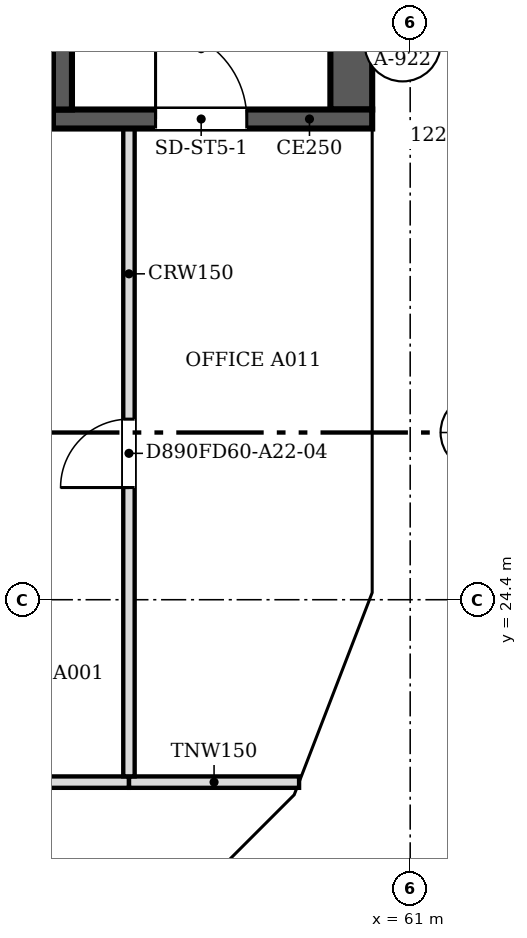
"""IFC4 building model, lengths in metres.
Left out: names, types, materials, properties, quantities, classifications, styles, units other than length and angle.
Written with IfcOpenShell. Run it as: python <this file> out.ifc"""

import sys

from ifc_helpers import new_model, si_unit, direction, frame, frame_2d, origin, place, context, subcontext, project, spatial, polyline, rectangle, outline, extrude, faceted_brep, source, transform, mapped, element, fill, save


model = new_model("IFC4")
c1 = context("Model", 3, precision=1e-05, world=origin(), true_north=direction((0.0, 1.0)))
c2 = subcontext(c1, "Body", "Model", "MODEL_VIEW")
j1 = project(units=[si_unit("LENGTHUNIT", "METRE"), si_unit("PLANEANGLEUNIT", "RADIAN")], contexts=[c1])
p1 = place(None, origin())
s1 = spatial("IfcSite", under=j1, at=p1, CompositionType="ELEMENT")
p2 = place(p1, origin())
s2 = spatial("IfcBuilding", under=s1, at=p2, CompositionType="ELEMENT")
p3 = place(p2, frame((0.0, 0.0, 255.9)))
s3 = spatial("IfcBuildingStorey", under=s2, at=p3, CompositionType="ELEMENT", Elevation=255.9)
m1 = source(origin(), c2, "Body", "Brep", [
    faceted_brep([(0.053, -0.25, 0.0), (2.997, -0.25, 3.8), (0.053, -0.25, 7.6), (0.0, -0.25, 7.532), (0.0, -0.25, 0.068), (0.106, 0.25, 7.531), (2.944, 0.25, 3.868), (2.944, 0.25, 3.732), (0.106, 0.25, 0.068), (2.997, 0.0, 3.8), (0.053, 0.0, 0.0), (0.053, 0.0, 7.6)], [[[0, 1, 2, 3, 4]], [[5, 6, 7, 8]], [[8, 7, 9, 1, 0, 10]], [[6, 5, 11, 2, 1, 9]], [[3, 2, 11]], [[10, 0, 4]], [[8, 10, 4, 3, 11, 5]], [[9, 7, 6]]]),
])
p4 = place(p3, frame((57.569, 19.574, -3.8), z_axis=(0.0, 0.0, 1.0), x_axis=(0.707106781187, 0.707106781187, 0.0)))
e1 = element("IfcWall", 1, at=p4, inside=s3, PredefinedType="SOLIDWALL", context=c2, shape_type="MappedRepresentation", body=[
    mapped(m1, transform((0.0, 0.0, 0.0), scale=1.0)),
])
m2 = source(origin(), c2, "Body", "SweptSolid", [
    extrude(outline(polyline([(0.253, 0.666), (2.681, 3.8), (0.253, 6.934), (0.253, 0.666)])), frame((0.0, 0.26, 0.0), z_axis=(0.0, -1.0, 0.0), x_axis=(1.0, 0.0, 0.0)), (0.0, 0.0, 1.0), 0.52),
])
p5 = place(p4, origin())
e2 = element("IfcOpeningElement", 2, at=p5, cuts=e1, PredefinedType="OPENING", context=c2, shape_type="MappedRepresentation", body=[
    mapped(m2, transform((0.0, 0.0, 0.0), scale=1.0)),
])
m3 = source(origin(), c2, "Body", "Brep", [
    faceted_brep([(2.95, -0.25, 0.0), (2.997, -0.25, 0.059), (2.997, -0.25, 7.541), (2.95, -0.25, 7.6), (0.0, -0.25, 3.8), (0.053, 0.25, 3.868), (2.904, 0.25, 7.54), (2.904, 0.25, 0.06), (0.053, 0.25, 3.732), (2.95, 0.0, 0.0), (2.95, 0.0, 7.6), (0.0, 0.0, 3.8)], [[[0, 1, 2, 3, 4]], [[5, 6, 7, 8]], [[1, 0, 9]], [[10, 3, 2]], [[6, 5, 11, 4, 3, 10]], [[8, 7, 9, 0, 4, 11]], [[8, 11, 5]], [[1, 9, 7, 6, 10, 2]]]),
])
p6 = place(p3, frame((59.688, 21.694, -3.8), z_axis=(0.0, 0.0, 1.0), x_axis=(0.359972353723, 0.932962970624, 0.0)))
e3 = element("IfcWall", 3, at=p6, inside=s3, PredefinedType="SOLIDWALL", context=c2, shape_type="MappedRepresentation", body=[
    mapped(m3, transform((0.0, 0.0, 0.0), scale=1.0)),
])
m4 = source(origin(), c2, "Body", "SweptSolid", [
    extrude(outline(polyline([(2.75, 6.935), (0.316, 3.8), (2.75, 0.665), (2.75, 6.935)])), frame((0.0, 0.26, 0.0), z_axis=(0.0, -1.0, 0.0), x_axis=(1.0, 0.0, 0.0)), (0.0, 0.0, 1.0), 0.52),
])
p7 = place(p6, origin())
e4 = element("IfcOpeningElement", 4, at=p7, cuts=e3, PredefinedType="OPENING", context=c2, shape_type="MappedRepresentation", body=[
    mapped(m4, transform((0.0, 0.0, 0.0), scale=1.0)),
])
m5 = source(origin(), c2, "Body", "Brep", [
    faceted_brep([(0.047, -0.25, 0.0), (3.05, -0.25, 3.8), (0.047, -0.25, 7.6), (0.0, -0.25, 7.54), (0.0, -0.25, 0.06), (0.093, 0.25, 7.541), (3.05, 0.25, 3.8), (0.093, 0.25, 0.059), (0.047, 0.0, 0.0), (0.047, 0.0, 7.6)], [[[0, 1, 2, 3, 4]], [[5, 6, 7]], [[7, 6, 1, 0, 8]], [[6, 5, 9, 2, 1]], [[3, 2, 9]], [[8, 0, 4]], [[7, 8, 4, 3, 9, 5]]]),
])
p8 = place(p3, frame((60.75, 24.4, -3.8), z_axis=(0.0, 0.0, 1.0), x_axis=(0.0, 1.0, 0.0)))
e5 = element("IfcWall", 5, at=p8, inside=s3, PredefinedType="SOLIDWALL", context=c2, shape_type="MappedRepresentation", body=[
    mapped(m5, transform((0.0, 0.0, 0.0), scale=1.0)),
])
m6 = source(origin(), c2, "Body", "SweptSolid", [
    extrude(outline(polyline([(0.247, 0.656), (2.731, 3.8), (0.247, 6.944), (0.247, 0.656)])), frame((0.0, 0.26, 0.0), z_axis=(0.0, -1.0, 0.0), x_axis=(1.0, 0.0, 0.0)), (0.0, 0.0, 1.0), 0.52),
])
p9 = place(p8, origin())
e6 = element("IfcOpeningElement", 6, at=p9, cuts=e5, PredefinedType="OPENING", context=c2, shape_type="MappedRepresentation", body=[
    mapped(m6, transform((0.0, 0.0, 0.0), scale=1.0)),
])
m7 = source(origin(), c2, "Body", "SweptSolid", [
    extrude(outline(polyline([(3.05, 0.0), (6.1, 3.8), (3.05, 7.6), (0.0, 3.8), (3.05, 0.0)])), frame((0.0, 0.25, 0.0), z_axis=(0.0, -1.0, 0.0), x_axis=(1.0, 0.0, 0.0)), (0.0, 0.0, 1.0), 0.5),
])
p10 = place(p3, frame((60.75, 27.45, -3.8), z_axis=(0.0, 0.0, 1.0), x_axis=(0.0, 1.0, 0.0)))
e7 = element("IfcWall", 7, at=p10, inside=s3, PredefinedType="SOLIDWALL", context=c2, shape_type="MappedRepresentation", body=[
    mapped(m7, transform((0.0, 0.0, 0.0), scale=1.0)),
])
m8 = source(origin(), c2, "Body", "SweptSolid", [
    extrude(outline(polyline([(3.05, 0.399), (5.78, 3.8), (3.05, 7.2), (0.321, 3.8), (3.05, 0.399)])), frame((0.0, 0.26, 0.0), z_axis=(0.0, -1.0, 0.0), x_axis=(1.0, 0.0, 0.0)), (0.0, 0.0, 1.0), 0.52),
])
p11 = place(p10, origin())
e8 = element("IfcOpeningElement", 8, at=p11, cuts=e7, PredefinedType="OPENING", context=c2, shape_type="MappedRepresentation", body=[
    mapped(m8, transform((0.0, 0.0, 0.0), scale=1.0)),
])
m9 = source(origin(), c2, "Body", "Brep", [
    faceted_brep([(2.944, -0.25, 0.0), (2.997, -0.25, 0.068), (2.997, -0.25, 3.8), (0.0, -0.25, 3.8), (0.053, 0.25, 3.8), (2.891, 0.25, 3.8), (2.891, 0.25, 0.068), (0.053, 0.25, 3.732), (2.944, 0.0, 0.0), (0.0, 0.0, 3.8)], [[[0, 1, 2, 3]], [[4, 5, 6, 7]], [[1, 0, 8]], [[5, 4, 9, 3, 2]], [[7, 6, 8, 0, 3, 9]], [[7, 9, 4]], [[1, 8, 6, 5, 2]]]),
])
p12 = place(p3, frame((57.606, 19.612, 0.0), z_axis=(0.0, 0.0, 1.0), x_axis=(0.707106781187, 0.707106781187, 0.0)))
e9 = element("IfcWall", 9, at=p12, inside=s3, PredefinedType="SOLIDWALL", context=c2, shape_type="MappedRepresentation", body=[
    mapped(m9, transform((0.0, 0.0, 0.0), scale=1.0)),
])
m10 = source(origin(), c2, "Body", "SweptSolid", [
    extrude(outline(polyline([(2.744, 3.55), (0.51, 3.55), (2.744, 0.667), (2.744, 3.55)])), frame((0.0, 0.26, 0.0), z_axis=(0.0, -1.0, 0.0), x_axis=(1.0, 0.0, 0.0)), (0.0, 0.0, 1.0), 0.52),
])
p13 = place(p12, origin())
e10 = element("IfcOpeningElement", 10, at=p13, cuts=e9, PredefinedType="OPENING", context=c2, shape_type="MappedRepresentation", body=[
    mapped(m10, transform((0.0, 0.0, 0.0), scale=1.0)),
])
m11 = source(origin(), c2, "Body", "Brep", [
    faceted_brep([(0.053, -0.25, 0.0), (3.003, -0.25, 3.8), (0.0, -0.25, 3.8), (0.0, -0.25, 0.068), (0.106, 0.25, 3.8), (2.957, 0.25, 3.8), (2.957, 0.25, 3.74), (0.106, 0.25, 0.068), (3.003, 0.0, 3.8), (0.053, 0.0, 0.0)], [[[0, 1, 2, 3]], [[4, 5, 6, 7]], [[7, 6, 8, 1, 0, 9]], [[5, 4, 2, 1, 8]], [[9, 0, 3]], [[7, 9, 3, 2, 4]], [[6, 5, 8]]]),
])
p14 = place(p3, frame((59.669, 21.644, 0.0), z_axis=(0.0, 0.0, 1.0), x_axis=(0.35992665181, 0.932980602862, 0.0)))
e11 = element("IfcWall", 11, at=p14, inside=s3, PredefinedType="SOLIDWALL", context=c2, shape_type="MappedRepresentation", body=[
    mapped(m11, transform((0.0, 0.0, 0.0), scale=1.0)),
])
m12 = source(origin(), c2, "Body", "SweptSolid", [
    extrude(outline(polyline([(0.253, 0.665), (2.493, 3.55), (0.253, 3.55), (0.253, 0.665)])), frame((0.0, 0.26, 0.0), z_axis=(0.0, -1.0, 0.0), x_axis=(1.0, 0.0, 0.0)), (0.0, 0.0, 1.0), 0.52),
])
p15 = place(p14, origin())
e12 = element("IfcOpeningElement", 12, at=p15, cuts=e11, PredefinedType="OPENING", context=c2, shape_type="MappedRepresentation", body=[
    mapped(m12, transform((0.0, 0.0, 0.0), scale=1.0)),
])
m13 = source(origin(), c2, "Body", "Brep", [
    faceted_brep([(3.003, -0.25, 0.0), (6.053, -0.25, 3.8), (0.0, -0.25, 3.8), (0.047, 0.25, 3.8), (6.053, 0.25, 3.8), (3.003, 0.25, 0.0), (0.047, 0.25, 3.741), (0.0, 0.0, 3.8)], [[[0, 1, 2]], [[3, 4, 5, 6]], [[5, 4, 1, 0]], [[4, 3, 7, 2, 1]], [[6, 5, 0, 2, 7]], [[6, 7, 3]]]),
])
p16 = place(p3, frame((60.75, 24.447, 0.0), z_axis=(0.0, 0.0, 1.0), x_axis=(0.0, 1.0, 0.0)))
e13 = element("IfcWall", 13, at=p16, inside=s3, PredefinedType="SOLIDWALL", context=c2, shape_type="MappedRepresentation", body=[
    mapped(m13, transform((0.0, 0.0, 0.0), scale=1.0)),
])
m14 = source(origin(), c2, "Body", "SweptSolid", [
    extrude(outline(polyline([(3.005, 0.401), (5.532, 3.55), (0.516, 3.55), (3.005, 0.401)])), frame((0.0, 0.26, 0.0), z_axis=(0.0, -1.0, 0.0), x_axis=(1.0, 0.0, 0.0)), (0.0, 0.0, 1.0), 0.52),
])
p17 = place(p16, origin())
e14 = element("IfcOpeningElement", 14, at=p17, cuts=e13, PredefinedType="OPENING", context=c2, shape_type="MappedRepresentation", body=[
    mapped(m14, transform((0.0, 0.0, 0.0), scale=1.0)),
])
m15 = source(origin(), c2, "Body", "SweptSolid", [
    extrude(outline(polyline([(3.05, 0.0), (6.1, 3.8), (0.0, 3.8), (3.05, 0.0)])), frame((0.0, 0.25, 0.0), z_axis=(0.0, -1.0, 0.0), x_axis=(1.0, 0.0, 0.0)), (0.0, 0.0, 1.0), 0.5),
])
p18 = place(p3, frame((60.75, 30.5, 0.0), z_axis=(0.0, 0.0, 1.0), x_axis=(0.0, 1.0, 0.0)))
e15 = element("IfcWall", 15, at=p18, inside=s3, PredefinedType="SOLIDWALL", context=c2, shape_type="MappedRepresentation", body=[
    mapped(m15, transform((0.0, 0.0, 0.0), scale=1.0)),
])
m16 = source(origin(), c2, "Body", "SweptSolid", [
    extrude(outline(polyline([(3.05, 0.399), (5.579, 3.55), (0.521, 3.55), (3.05, 0.399)])), frame((0.0, 0.26, 0.0), z_axis=(0.0, -1.0, 0.0), x_axis=(1.0, 0.0, 0.0)), (0.0, 0.0, 1.0), 0.52),
])
p19 = place(p18, origin())
e16 = element("IfcOpeningElement", 16, at=p19, cuts=e15, PredefinedType="OPENING", context=c2, shape_type="MappedRepresentation", body=[
    mapped(m16, transform((0.0, 0.0, 0.0), scale=1.0)),
])
p20 = place(p3, frame((60.5, 30.725, 0.0), z_axis=(0.0, 0.0, 1.0), x_axis=(-1.0, 0.0, 0.0)))
e17 = element("IfcWall", 17, at=p20, inside=s3, PredefinedType="SOLIDWALL", context=c2, shape_type="SweptSolid", body=[
    extrude(rectangle(XDim=4.2, YDim=0.25, at=frame_2d((2.1, 0.0))), origin(), (0.0, 0.0, 1.0), 3.8),
])
m17 = source(origin(), c2, "Body", "SweptSolid", [
    extrude(rectangle(XDim=1.2, YDim=2.1, at=frame_2d((0.6, 1.05))), frame((0.0, 0.135, 0.0), z_axis=(0.0, -1.0, 0.0), x_axis=(1.0, 0.0, 0.0)), (0.0, 0.0, 1.0), 0.27),
])
p21 = place(p20, frame((1.65, 0.0, 0.0)))
e18 = element("IfcOpeningElement", 18, at=p21, cuts=e17, PredefinedType="OPENING", context=c2, shape_type="MappedRepresentation", body=[
    mapped(m17, transform((0.0, 0.0, 0.0), scale=1.0)),
])
p22 = place(p3, frame((56.425, 30.85, 0.0), z_axis=(0.0, 0.0, 1.0), x_axis=(0.0, 1.0, 0.0)))
e19 = element("IfcWall", 19, at=p22, inside=s3, PredefinedType="SOLIDWALL", context=c2, shape_type="SweptSolid", body=[
    extrude(rectangle(XDim=8.0, YDim=0.25, at=frame_2d((4.0, 0.0))), origin(), (0.0, 0.0, 1.0), 3.8),
])
p23 = place(p3, frame((60.225, 38.85, 0.0), z_axis=(0.0, 0.0, 1.0), x_axis=(0.0, -1.0, 0.0)))
e20 = element("IfcWall", 20, at=p23, inside=s3, PredefinedType="SOLIDWALL", context=c2, shape_type="SweptSolid", body=[
    extrude(rectangle(XDim=8.0, YDim=0.55, at=frame_2d((4.0, 0.0))), origin(), (0.0, 0.0, 1.0), 3.8),
])
p24 = place(p3, frame((57.3, 22.0, 0.0), z_axis=(0.0, 0.0, 1.0), x_axis=(-1.0, 0.0, 0.0)))
e21 = element("IfcWall", 21, at=p24, inside=s3, PredefinedType="PARTITIONING", context=c2, shape_type="SweptSolid", body=[
    extrude(rectangle(XDim=29.2, YDim=0.15, at=frame_2d((14.6, 0.0))), origin(), (0.0, 0.0, 1.0), 2.947),
])
m18 = source(origin(), c2, "Body", "SweptSolid", [
    extrude(rectangle(XDim=0.9, YDim=2.1, at=frame_2d((0.45, 1.05))), frame((0.0, 0.085, 0.0), z_axis=(0.0, -1.0, 0.0), x_axis=(1.0, 0.0, 0.0)), (0.0, 0.0, 1.0), 0.17),
])
p25 = place(p24, frame((22.7, 0.0, 0.0)))
e22 = element("IfcOpeningElement", 22, at=p25, cuts=e21, PredefinedType="OPENING", context=c2, shape_type="MappedRepresentation", body=[
    mapped(m18, transform((0.0, 0.0, 0.0), scale=1.0)),
])
p26 = place(p24, frame((8.1, 0.0, 0.0)))
e23 = element("IfcOpeningElement", 23, at=p26, cuts=e21, PredefinedType="OPENING", context=c2, shape_type="MappedRepresentation", body=[
    mapped(m18, transform((0.0, 0.0, 0.0), scale=1.0)),
])
p27 = place(p3, frame((57.301, 22.0, 0.0), z_axis=(0.0, 0.0, 1.0), x_axis=(1.0, 0.0, 0.0)))
e24 = element("IfcWall", 24, at=p27, inside=s3, PredefinedType="PARTITIONING", context=c2, shape_type="SweptSolid", body=[
    extrude(rectangle(XDim=2.237, YDim=0.15, at=frame_2d((1.119, 0.0))), origin(), (0.0, 0.0, 1.0), 2.947),
])
p28 = place(p3, frame((57.3, 30.6, 0.0), z_axis=(0.0, 0.0, 1.0), x_axis=(0.0, -1.0, 0.0)))
e25 = element("IfcWall", 25, at=p28, inside=s3, PredefinedType="PARTITIONING", context=c2, shape_type="SweptSolid", body=[
    extrude(rectangle(XDim=8.524, YDim=0.15, at=frame_2d((4.262, 0.0))), origin(), (0.0, 0.0, 1.0), 2.947),
])
p29 = place(p28, frame((3.824, 0.0, 0.0)))
e26 = element("IfcOpeningElement", 26, at=p29, cuts=e25, PredefinedType="OPENING", context=c2, shape_type="MappedRepresentation", body=[
    mapped(m18, transform((0.0, 0.0, 0.0), scale=1.0)),
])
m19 = source(origin(), c2, "Body", "SweptSolid", [
    extrude(rectangle(XDim=1.2, YDim=2.1, at=frame_2d((0.6, 1.05))), frame((0.0, 0.025, 0.0), z_axis=(0.0, -1.0, 0.0), x_axis=(1.0, 0.0, 0.0)), (0.0, 0.0, 1.0), 0.05),
])
p30 = place(p21, origin())
e27 = element("IfcDoor", 27, at=p30, inside=s3, OperationType="SINGLE_SWING_RIGHT", PredefinedType="DOOR", context=c2, shape_type="MappedRepresentation", body=[
    mapped(m19, transform((0.0, 0.0, 0.0), scale=1.0)),
])
fill(e18, e27)
m20 = source(origin(), c2, "Body", "SweptSolid", [
    extrude(rectangle(XDim=0.9, YDim=2.1, at=frame_2d((0.45, 1.05))), frame((0.0, 0.025, 0.0), z_axis=(0.0, -1.0, 0.0), x_axis=(1.0, 0.0, 0.0)), (0.0, 0.0, 1.0), 0.05),
])
p31 = place(p29, origin())
e28 = element("IfcDoor", 28, at=p31, inside=s3, OperationType="SINGLE_SWING_RIGHT", PredefinedType="DOOR", context=c2, shape_type="MappedRepresentation", body=[
    mapped(m20, transform((0.0, 0.0, 0.0), scale=1.0)),
])
fill(e26, e28)
save(model, sys.argv[1])
